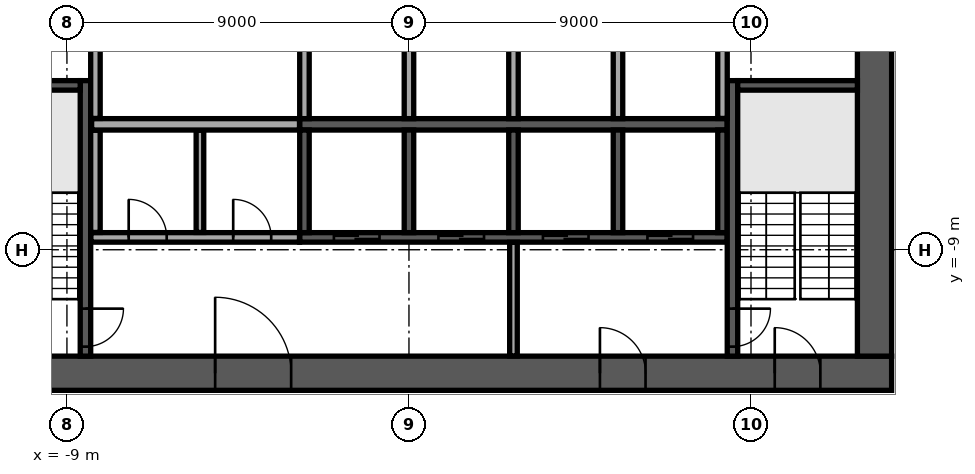
"""IFC4 building model, lengths in metres.
Left out: names, types, materials, properties, quantities, classifications, styles, units other than length and angle.
Written with IfcOpenShell. Run it as: python <this file> out.ifc"""

import sys

from ifc_helpers import new_model, si_unit, direction, frame, frame_2d, origin, place, context, subcontext, project, spatial, rectangle, extrude, element, fill, save


model = new_model("IFC4")
c1 = context("Model", 3, precision=1e-05, world=origin(), true_north=direction((0.0, 1.0)))
c2 = subcontext(c1, "Body", "Model", "MODEL_VIEW")
j1 = project(units=[si_unit("LENGTHUNIT", "METRE"), si_unit("PLANEANGLEUNIT", "RADIAN")], contexts=[c1])
p1 = place(None, origin())
s1 = spatial("IfcSite", under=j1, at=p1, CompositionType="ELEMENT")
p2 = place(p1, origin())
s2 = spatial("IfcBuilding", under=s1, at=p2, CompositionType="ELEMENT")
p3 = place(p2, frame((0.0, 0.0, 189.3)))
s3 = spatial("IfcBuildingStorey", under=s2, at=p3, CompositionType="ELEMENT", Elevation=189.3)
p4 = place(p3, frame((-12.7, -12.25, 0.0), z_axis=(0.0, 0.0, 1.0), x_axis=(1.0, 0.0, 0.0)))
e1 = element("IfcWall", 1, at=p4, inside=s3, PredefinedType="SHEAR", context=c2, shape_type="SweptSolid", body=[
    extrude(rectangle(XDim=25.4, YDim=0.9, at=frame_2d((12.7, 0.0))), origin(), (0.0, 0.0, 1.0), 3.62),
])
p5 = place(p4, frame((7.6, 0.0, 0.0)))
e2 = element("IfcOpeningElement", 2, at=p5, cuts=e1, PredefinedType="OPENING", context=c2, shape_type="SweptSolid", body=[
    extrude(rectangle(XDim=2.0, YDim=2.1, at=frame_2d((1.0, 1.05))), frame((0.0, 0.46, 0.0), z_axis=(0.0, -1.0, 0.0), x_axis=(1.0, 0.0, 0.0)), (0.0, 0.0, 1.0), 0.92),
])
p6 = place(p4, frame((17.725, 0.0, 0.0)))
e3 = element("IfcOpeningElement", 3, at=p6, cuts=e1, PredefinedType="OPENING", context=c2, shape_type="SweptSolid", body=[
    extrude(rectangle(XDim=1.2, YDim=2.1, at=frame_2d((0.6, 1.05))), frame((0.0, 0.46, 0.0), z_axis=(0.0, -1.0, 0.0), x_axis=(1.0, 0.0, 0.0)), (0.0, 0.0, 1.0), 0.92),
])
p7 = place(p4, frame((1.875, 0.0, 0.0)))
e4 = element("IfcOpeningElement", 4, at=p7, cuts=e1, PredefinedType="OPENING", context=c2, shape_type="SweptSolid", body=[
    extrude(rectangle(XDim=1.2, YDim=2.1, at=frame_2d((0.6, 1.05))), frame((0.0, 0.46, 0.0), z_axis=(0.0, -1.0, 0.0), x_axis=(1.0, 0.0, 0.0)), (0.0, 0.0, 1.0), 0.92),
])
p8 = place(p4, frame((22.325, 0.0, 0.0)))
e5 = element("IfcOpeningElement", 5, at=p8, cuts=e1, PredefinedType="OPENING", context=c2, shape_type="SweptSolid", body=[
    extrude(rectangle(XDim=1.2, YDim=2.1, at=frame_2d((0.6, 1.05))), frame((0.0, 0.46, 0.0), z_axis=(0.0, -1.0, 0.0), x_axis=(1.0, 0.0, 0.0)), (0.0, 0.0, 1.0), 0.92),
])
p9 = place(p3, frame((12.25, -11.8, 0.0), z_axis=(0.0, 0.0, 1.0), x_axis=(0.0, 1.0, 0.0)))
e6 = element("IfcWall", 6, at=p9, inside=s3, PredefinedType="SHEAR", context=c2, shape_type="SweptSolid", body=[
    extrude(rectangle(XDim=23.6, YDim=0.9, at=frame_2d((11.8, 0.0))), origin(), (0.0, 0.0, 1.0), 3.62),
])
p10 = place(p9, frame((10.6, 0.0, 0.0)))
e7 = element("IfcOpeningElement", 7, at=p10, cuts=e6, PredefinedType="OPENING", context=c2, shape_type="SweptSolid", body=[
    extrude(rectangle(XDim=2.4, YDim=2.4, at=frame_2d((1.2, 1.2))), frame((0.0, 0.46, 0.0), z_axis=(0.0, -1.0, 0.0), x_axis=(1.0, 0.0, 0.0)), (0.0, 0.0, 1.0), 0.92),
])
p11 = place(p3, frame((-2.875, -5.7, 0.0), z_axis=(0.0, 0.0, 1.0), x_axis=(1.0, 0.0, 0.0)))
e8 = element("IfcWall", 8, at=p11, inside=s3, PredefinedType="SOLIDWALL", context=c2, shape_type="SweptSolid", body=[
    extrude(rectangle(XDim=11.25, YDim=0.3, at=frame_2d((5.625, 0.0))), origin(), (0.0, 0.0, 1.0), 3.62),
])
for number, where, z_axis, x_axis in (
    (9, (-2.75, -5.55, 0.0), (0.0, 0.0, 1.0), (0.0, 1.0, 0.0)),
    (10, (0.0, -5.55, 0.0), (0.0, 0.0, 1.0), (0.0, 1.0, 0.0)),
    (11, (2.75, -5.55, 0.0), (0.0, 0.0, 1.0), (0.0, 1.0, 0.0)),
    (12, (5.5, -5.55, 0.0), (0.0, 0.0, 1.0), (0.0, 1.0, 0.0)),
):
    element("IfcWall", number, at=place(p3, frame(where, z_axis=z_axis, x_axis=x_axis)), inside=s3, PredefinedType="SOLIDWALL", context=c2, shape_type="SweptSolid", body=[
        extrude(rectangle(XDim=2.7, YDim=0.25, at=frame_2d((1.35, 0.0))), origin(), (0.0, 0.0, 1.0), 3.62),
    ])
p12 = place(p3, frame((-2.875, -8.675, 0.0), z_axis=(0.0, 0.0, 1.0), x_axis=(1.0, 0.0, 0.0)))
e13 = element("IfcWall", 13, at=p12, inside=s3, PredefinedType="SOLIDWALL", context=c2, shape_type="SweptSolid", body=[
    extrude(rectangle(XDim=11.25, YDim=0.25, at=frame_2d((5.625, 0.0))), origin(), (0.0, 0.0, 1.0), 3.62),
])
p13 = place(p12, frame((0.9, 0.0, 0.0)))
e14 = element("IfcOpeningElement", 14, at=p13, cuts=e13, PredefinedType="OPENING", context=c2, shape_type="SweptSolid", body=[
    extrude(rectangle(XDim=1.2, YDim=2.1, at=frame_2d((0.6, 1.05))), frame((0.0, 0.135, 0.0), z_axis=(0.0, -1.0, 0.0), x_axis=(1.0, 0.0, 0.0)), (0.0, 0.0, 1.0), 0.27),
])
p14 = place(p12, frame((3.65, 0.0, 0.0)))
e15 = element("IfcOpeningElement", 15, at=p14, cuts=e13, PredefinedType="OPENING", context=c2, shape_type="SweptSolid", body=[
    extrude(rectangle(XDim=1.2, YDim=2.1, at=frame_2d((0.6, 1.05))), frame((0.0, 0.135, 0.0), z_axis=(0.0, -1.0, 0.0), x_axis=(1.0, 0.0, 0.0)), (0.0, 0.0, 1.0), 0.27),
])
p15 = place(p12, frame((6.4, 0.0, 0.0)))
e16 = element("IfcOpeningElement", 16, at=p15, cuts=e13, PredefinedType="OPENING", context=c2, shape_type="SweptSolid", body=[
    extrude(rectangle(XDim=1.2, YDim=2.1, at=frame_2d((0.6, 1.05))), frame((0.0, 0.135, 0.0), z_axis=(0.0, -1.0, 0.0), x_axis=(1.0, 0.0, 0.0)), (0.0, 0.0, 1.0), 0.27),
])
p16 = place(p12, frame((9.15, 0.0, 0.0)))
e17 = element("IfcOpeningElement", 17, at=p16, cuts=e13, PredefinedType="OPENING", context=c2, shape_type="SweptSolid", body=[
    extrude(rectangle(XDim=1.2, YDim=2.1, at=frame_2d((0.6, 1.05))), frame((0.0, 0.135, 0.0), z_axis=(0.0, -1.0, 0.0), x_axis=(1.0, 0.0, 0.0)), (0.0, 0.0, 1.0), 0.27),
])
for number, where, z_axis, x_axis in (
    (18, (-2.75, -8.55, 0.0), (0.0, 0.0, 1.0), (0.0, 1.0, 0.0)),
    (19, (0.0, -8.55, 0.0), (0.0, 0.0, 1.0), (0.0, 1.0, 0.0)),
    (20, (2.75, -8.55, 0.0), (0.0, 0.0, 1.0), (0.0, 1.0, 0.0)),
    (21, (5.5, -8.55, 0.0), (0.0, 0.0, 1.0), (0.0, 1.0, 0.0)),
    (22, (8.25, -8.55, 0.0), (0.0, 0.0, 1.0), (0.0, 1.0, 0.0)),
):
    element("IfcWall", number, at=place(p3, frame(where, z_axis=z_axis, x_axis=x_axis)), inside=s3, PredefinedType="SOLIDWALL", context=c2, shape_type="SweptSolid", body=[
        extrude(rectangle(XDim=2.7, YDim=0.25, at=frame_2d((1.35, 0.0))), origin(), (0.0, 0.0, 1.0), 3.62),
    ])
p17 = place(p3, frame((-8.512, -4.55, 0.0), z_axis=(0.0, 0.0, 1.0), x_axis=(0.0, -1.0, 0.0)))
e23 = element("IfcWall", 23, at=p17, inside=s3, PredefinedType="SOLIDWALL", context=c2, shape_type="SweptSolid", body=[
    extrude(rectangle(XDim=7.25, YDim=0.275, at=frame_2d((3.625, 0.0))), origin(), (0.0, 0.0, 1.0), 3.62),
])
p18 = place(p17, frame((6.0, 0.0, 0.0)))
e24 = element("IfcOpeningElement", 24, at=p18, cuts=e23, PredefinedType="OPENING", context=c2, shape_type="SweptSolid", body=[
    extrude(rectangle(XDim=1.0, YDim=2.1, at=frame_2d((0.5, 1.05))), frame((0.0, 0.147, 0.0), z_axis=(0.0, -1.0, 0.0), x_axis=(1.0, 0.0, 0.0)), (0.0, 0.0, 1.0), 0.295),
])
p19 = place(p3, frame((-8.65, -4.675, 0.0), z_axis=(0.0, 0.0, 1.0), x_axis=(-1.0, 0.0, 0.0)))
e25 = element("IfcWall", 25, at=p19, inside=s3, PredefinedType="SOLIDWALL", context=c2, shape_type="SweptSolid", body=[
    extrude(rectangle(XDim=3.15, YDim=0.25, at=frame_2d((1.575, 0.0))), origin(), (0.0, 0.0, 1.0), 3.62),
])
p20 = place(p3, frame((8.512, -4.55, 0.0), z_axis=(0.0, 0.0, 1.0), x_axis=(0.0, -1.0, 0.0)))
e26 = element("IfcWall", 26, at=p20, inside=s3, PredefinedType="SOLIDWALL", context=c2, shape_type="SweptSolid", body=[
    extrude(rectangle(XDim=7.25, YDim=0.275, at=frame_2d((3.625, 0.0))), origin(), (0.0, 0.0, 1.0), 3.62),
])
p21 = place(p20, frame((6.0, 0.0, 0.0)))
e27 = element("IfcOpeningElement", 27, at=p21, cuts=e26, PredefinedType="OPENING", context=c2, shape_type="SweptSolid", body=[
    extrude(rectangle(XDim=1.0, YDim=2.1, at=frame_2d((0.5, 1.05))), frame((0.0, 0.147, 0.0), z_axis=(0.0, -1.0, 0.0), x_axis=(1.0, 0.0, 0.0)), (0.0, 0.0, 1.0), 0.295),
])
p22 = place(p3, frame((8.65, -4.675, 0.0), z_axis=(0.0, 0.0, 1.0), x_axis=(1.0, 0.0, 0.0)))
e28 = element("IfcWall", 28, at=p22, inside=s3, PredefinedType="SOLIDWALL", context=c2, shape_type="SweptSolid", body=[
    extrude(rectangle(XDim=3.15, YDim=0.25, at=frame_2d((1.575, 0.0))), origin(), (0.0, 0.0, 1.0), 3.62),
])
p23 = place(p3, frame((2.75, -11.795, 0.0), z_axis=(0.0, 0.0, 1.0), x_axis=(0.0, 1.0, 0.0)))
e29 = element("IfcWall", 29, at=p23, inside=s3, PredefinedType="PARTITIONING", context=c2, shape_type="SweptSolid", body=[
    extrude(rectangle(XDim=2.99, YDim=0.2, at=frame_2d((1.495, 0.0))), origin(), (0.0, 0.0, 1.0), 3.62),
])
p24 = place(p3, frame((-8.37, -8.675, 0.0), z_axis=(0.0, 0.0, 1.0), x_axis=(1.0, 0.0, 0.0)))
e30 = element("IfcWall", 30, at=p24, inside=s3, PredefinedType="PARTITIONING", context=c2, shape_type="SweptSolid", body=[
    extrude(rectangle(XDim=5.49, YDim=0.25, at=frame_2d((2.745, 0.0))), origin(), (0.0, 0.0, 1.0), 3.62),
])
p25 = place(p24, frame((0.995, 0.0, 0.0)))
e31 = element("IfcOpeningElement", 31, at=p25, cuts=e30, PredefinedType="OPENING", context=c2, shape_type="SweptSolid", body=[
    extrude(rectangle(XDim=1.0, YDim=2.1, at=frame_2d((0.5, 1.05))), frame((0.0, 0.135, 0.0), z_axis=(0.0, -1.0, 0.0), x_axis=(1.0, 0.0, 0.0)), (0.0, 0.0, 1.0), 0.27),
])
p26 = place(p24, frame((3.745, 0.0, 0.0)))
e32 = element("IfcOpeningElement", 32, at=p26, cuts=e30, PredefinedType="OPENING", context=c2, shape_type="SweptSolid", body=[
    extrude(rectangle(XDim=1.0, YDim=2.1, at=frame_2d((0.5, 1.05))), frame((0.0, 0.135, 0.0), z_axis=(0.0, -1.0, 0.0), x_axis=(1.0, 0.0, 0.0)), (0.0, 0.0, 1.0), 0.27),
])
p27 = place(p3, frame((-8.25, -8.545, 0.0), z_axis=(0.0, 0.0, 1.0), x_axis=(0.0, 1.0, 0.0)))
e33 = element("IfcWall", 33, at=p27, inside=s3, PredefinedType="PARTITIONING", context=c2, shape_type="SweptSolid", body=[
    extrude(rectangle(XDim=2.69, YDim=0.25, at=frame_2d((1.345, 0.0))), origin(), (0.0, 0.0, 1.0), 3.62),
])
p28 = place(p3, frame((-5.5, -8.545, 0.0), z_axis=(0.0, 0.0, 1.0), x_axis=(0.0, 1.0, 0.0)))
e34 = element("IfcWall", 34, at=p28, inside=s3, PredefinedType="PARTITIONING", context=c2, shape_type="SweptSolid", body=[
    extrude(rectangle(XDim=2.69, YDim=0.2, at=frame_2d((1.345, 0.0))), origin(), (0.0, 0.0, 1.0), 3.62),
])
p29 = place(p3, frame((-8.35, -5.7, 0.0), z_axis=(0.0, 0.0, 1.0), x_axis=(1.0, 0.0, 0.0)))
e35 = element("IfcWall", 35, at=p29, inside=s3, PredefinedType="PARTITIONING", context=c2, shape_type="SweptSolid", body=[
    extrude(rectangle(XDim=5.47, YDim=0.3, at=frame_2d((2.735, 0.0))), origin(), (0.0, 0.0, 1.0), 3.62),
])
for number, where, z_axis, x_axis in (
    (36, (-8.25, -5.545, 0.0), (0.0, 0.0, 1.0), (0.0, 1.0, 0.0)),
    (37, (8.25, -5.545, 0.0), (0.0, 0.0, 1.0), (0.0, 1.0, 0.0)),
):
    element("IfcWall", number, at=place(p3, frame(where, z_axis=z_axis, x_axis=x_axis)), inside=s3, PredefinedType="PARTITIONING", context=c2, shape_type="SweptSolid", body=[
        extrude(rectangle(XDim=2.69, YDim=0.25, at=frame_2d((1.345, 0.0))), origin(), (0.0, 0.0, 1.0), 3.62),
    ])
p30 = place(p3, frame((-2.286, -34.715, 0.0), z_axis=(0.0, 0.0, 1.0), x_axis=(0.754708272811, 0.656060532993, 0.0)))
e38 = element("IfcWall", 38, at=p30, inside=s3, PredefinedType="STANDARD", context=c2, shape_type="SweptSolid", body=[
    extrude(rectangle(XDim=49.0, YDim=0.6, at=frame_2d((24.5, 0.0))), origin(), (0.0, 0.0, 1.0), 3.62),
])
p31 = place(p30, frame((1.227, 0.0, 0.9)))
e39 = element("IfcOpeningElement", 39, at=p31, cuts=e38, PredefinedType="OPENING", context=c2, shape_type="SweptSolid", body=[
    extrude(rectangle(XDim=2.0, YDim=2.1, at=frame_2d((1.0, 1.05))), frame((0.0, 0.31, 0.0), z_axis=(0.0, -1.0, 0.0), x_axis=(1.0, 0.0, 0.0)), (0.0, 0.0, 1.0), 0.62),
])
p32 = place(p30, frame((5.682, 0.0, 0.9)))
e40 = element("IfcOpeningElement", 40, at=p32, cuts=e38, PredefinedType="OPENING", context=c2, shape_type="SweptSolid", body=[
    extrude(rectangle(XDim=2.0, YDim=2.1, at=frame_2d((1.0, 1.05))), frame((0.0, 0.31, 0.0), z_axis=(0.0, -1.0, 0.0), x_axis=(1.0, 0.0, 0.0)), (0.0, 0.0, 1.0), 0.62),
])
p33 = place(p30, frame((10.136, 0.0, 0.9)))
e41 = element("IfcOpeningElement", 41, at=p33, cuts=e38, PredefinedType="OPENING", context=c2, shape_type="SweptSolid", body=[
    extrude(rectangle(XDim=2.0, YDim=2.1, at=frame_2d((1.0, 1.05))), frame((0.0, 0.31, 0.0), z_axis=(0.0, -1.0, 0.0), x_axis=(1.0, 0.0, 0.0)), (0.0, 0.0, 1.0), 0.62),
])
p34 = place(p30, frame((14.591, 0.0, 0.9)))
e42 = element("IfcOpeningElement", 42, at=p34, cuts=e38, PredefinedType="OPENING", context=c2, shape_type="SweptSolid", body=[
    extrude(rectangle(XDim=2.0, YDim=2.1, at=frame_2d((1.0, 1.05))), frame((0.0, 0.31, 0.0), z_axis=(0.0, -1.0, 0.0), x_axis=(1.0, 0.0, 0.0)), (0.0, 0.0, 1.0), 0.62),
])
p35 = place(p30, frame((19.045, 0.0, 0.9)))
e43 = element("IfcOpeningElement", 43, at=p35, cuts=e38, PredefinedType="OPENING", context=c2, shape_type="SweptSolid", body=[
    extrude(rectangle(XDim=2.0, YDim=2.1, at=frame_2d((1.0, 1.05))), frame((0.0, 0.31, 0.0), z_axis=(0.0, -1.0, 0.0), x_axis=(1.0, 0.0, 0.0)), (0.0, 0.0, 1.0), 0.62),
])
p36 = place(p30, frame((23.5, 0.0, 0.9)))
e44 = element("IfcOpeningElement", 44, at=p36, cuts=e38, PredefinedType="OPENING", context=c2, shape_type="SweptSolid", body=[
    extrude(rectangle(XDim=2.0, YDim=2.1, at=frame_2d((1.0, 1.05))), frame((0.0, 0.31, 0.0), z_axis=(0.0, -1.0, 0.0), x_axis=(1.0, 0.0, 0.0)), (0.0, 0.0, 1.0), 0.62),
])
p37 = place(p30, frame((27.955, 0.0, 0.9)))
e45 = element("IfcOpeningElement", 45, at=p37, cuts=e38, PredefinedType="OPENING", context=c2, shape_type="SweptSolid", body=[
    extrude(rectangle(XDim=2.0, YDim=2.1, at=frame_2d((1.0, 1.05))), frame((0.0, 0.31, 0.0), z_axis=(0.0, -1.0, 0.0), x_axis=(1.0, 0.0, 0.0)), (0.0, 0.0, 1.0), 0.62),
])
p38 = place(p30, frame((32.409, 0.0, 0.9)))
e46 = element("IfcOpeningElement", 46, at=p38, cuts=e38, PredefinedType="OPENING", context=c2, shape_type="SweptSolid", body=[
    extrude(rectangle(XDim=2.0, YDim=2.1, at=frame_2d((1.0, 1.05))), frame((0.0, 0.31, 0.0), z_axis=(0.0, -1.0, 0.0), x_axis=(1.0, 0.0, 0.0)), (0.0, 0.0, 1.0), 0.62),
])
p39 = place(p30, frame((36.864, 0.0, 0.9)))
e47 = element("IfcOpeningElement", 47, at=p39, cuts=e38, PredefinedType="OPENING", context=c2, shape_type="SweptSolid", body=[
    extrude(rectangle(XDim=2.0, YDim=2.1, at=frame_2d((1.0, 1.05))), frame((0.0, 0.31, 0.0), z_axis=(0.0, -1.0, 0.0), x_axis=(1.0, 0.0, 0.0)), (0.0, 0.0, 1.0), 0.62),
])
p40 = place(p30, frame((41.318, 0.0, 0.9)))
e48 = element("IfcOpeningElement", 48, at=p40, cuts=e38, PredefinedType="OPENING", context=c2, shape_type="SweptSolid", body=[
    extrude(rectangle(XDim=2.0, YDim=2.1, at=frame_2d((1.0, 1.05))), frame((0.0, 0.31, 0.0), z_axis=(0.0, -1.0, 0.0), x_axis=(1.0, 0.0, 0.0)), (0.0, 0.0, 1.0), 0.62),
])
p41 = place(p30, frame((45.773, 0.0, 0.9)))
e49 = element("IfcOpeningElement", 49, at=p41, cuts=e38, PredefinedType="OPENING", context=c2, shape_type="SweptSolid", body=[
    extrude(rectangle(XDim=2.0, YDim=2.1, at=frame_2d((1.0, 1.05))), frame((0.0, 0.31, 0.0), z_axis=(0.0, -1.0, 0.0), x_axis=(1.0, 0.0, 0.0)), (0.0, 0.0, 1.0), 0.62),
])
p42 = place(p3, frame((-24.98, -4.673, 0.0), z_axis=(0.0, 0.0, 1.0), x_axis=(0.656048444225, -0.754718781289, 0.0)))
e50 = element("IfcWall", 50, at=p42, inside=s3, PredefinedType="PARTITIONING", context=c2, shape_type="SweptSolid", body=[
    extrude(rectangle(XDim=25.8, YDim=0.15, at=frame_2d((12.9, 0.0))), origin(), (0.0, 0.0, 1.0), 3.17),
])
p43 = place(p42, frame((12.071, 0.0, 0.0)))
e51 = element("IfcOpeningElement", 51, at=p43, cuts=e50, PredefinedType="OPENING", context=c2, shape_type="SweptSolid", body=[
    extrude(rectangle(XDim=1.0, YDim=2.1, at=frame_2d((0.5, 1.05))), frame((0.0, 0.085, 0.0), z_axis=(0.0, -1.0, 0.0), x_axis=(1.0, 0.0, 0.0)), (0.0, 0.0, 1.0), 0.17),
])
p44 = place(p42, frame((24.318, 0.0, 0.0)))
e52 = element("IfcOpeningElement", 52, at=p44, cuts=e50, PredefinedType="OPENING", context=c2, shape_type="SweptSolid", body=[
    extrude(rectangle(XDim=1.0, YDim=2.1, at=frame_2d((0.5, 1.05))), frame((0.0, 0.085, 0.0), z_axis=(0.0, -1.0, 0.0), x_axis=(1.0, 0.0, 0.0)), (0.0, 0.0, 1.0), 0.17),
])
p45 = place(p3, frame((-1.0, -26.268, 0.0), z_axis=(0.0, 0.0, 1.0), x_axis=(0.754711356604, 0.656056985492, 0.0)))
e53 = element("IfcWall", 53, at=p45, inside=s3, PredefinedType="PARTITIONING", context=c2, shape_type="SweptSolid", body=[
    extrude(rectangle(XDim=36.052, YDim=0.15, at=frame_2d((18.026, 0.0))), origin(), (0.0, 0.0, 1.0), 3.17),
])
p46 = place(p45, frame((9.598, 0.0, 0.0)))
e54 = element("IfcOpeningElement", 54, at=p46, cuts=e53, PredefinedType="OPENING", context=c2, shape_type="SweptSolid", body=[
    extrude(rectangle(XDim=1.0, YDim=2.1, at=frame_2d((0.5, 1.05))), frame((0.0, 0.085, 0.0), z_axis=(0.0, -1.0, 0.0), x_axis=(1.0, 0.0, 0.0)), (0.0, 0.0, 1.0), 0.17),
])
p47 = place(p45, frame((20.957, 0.0, 0.0)))
e55 = element("IfcOpeningElement", 55, at=p47, cuts=e53, PredefinedType="OPENING", context=c2, shape_type="SweptSolid", body=[
    extrude(rectangle(XDim=1.0, YDim=2.1, at=frame_2d((0.5, 1.05))), frame((0.0, 0.085, 0.0), z_axis=(0.0, -1.0, 0.0), x_axis=(1.0, 0.0, 0.0)), (0.0, 0.0, 1.0), 0.17),
])
p48 = place(p45, frame((27.87, 0.0, 0.0)))
e56 = element("IfcOpeningElement", 56, at=p48, cuts=e53, PredefinedType="OPENING", context=c2, shape_type="SweptSolid", body=[
    extrude(rectangle(XDim=1.8, YDim=2.1, at=frame_2d((0.9, 1.05))), frame((0.0, 0.085, 0.0), z_axis=(0.0, -1.0, 0.0), x_axis=(1.0, 0.0, 0.0)), (0.0, 0.0, 1.0), 0.17),
])
p49 = place(p5, origin())
e57 = element("IfcDoor", 57, at=p49, inside=s3, OperationType="SINGLE_SWING_LEFT", PredefinedType="DOOR", context=c2, shape_type="SweptSolid", body=[
    extrude(rectangle(XDim=2.0, YDim=2.1, at=frame_2d((1.0, 1.05))), frame((0.0, 0.025, 0.0), z_axis=(0.0, -1.0, 0.0), x_axis=(1.0, 0.0, 0.0)), (0.0, 0.0, 1.0), 0.05),
])
fill(e2, e57)
p50 = place(p6, origin())
e58 = element("IfcDoor", 58, at=p50, inside=s3, OperationType="SINGLE_SWING_LEFT", PredefinedType="DOOR", context=c2, shape_type="SweptSolid", body=[
    extrude(rectangle(XDim=1.2, YDim=2.1, at=frame_2d((0.6, 1.05))), frame((0.0, 0.025, 0.0), z_axis=(0.0, -1.0, 0.0), x_axis=(1.0, 0.0, 0.0)), (0.0, 0.0, 1.0), 0.05),
])
fill(e3, e58)
p51 = place(p8, origin())
e59 = element("IfcDoor", 59, at=p51, inside=s3, OperationType="SINGLE_SWING_LEFT", PredefinedType="DOOR", context=c2, shape_type="SweptSolid", body=[
    extrude(rectangle(XDim=1.2, YDim=2.1, at=frame_2d((0.6, 1.05))), frame((0.0, 0.025, 0.0), z_axis=(0.0, -1.0, 0.0), x_axis=(1.0, 0.0, 0.0)), (0.0, 0.0, 1.0), 0.05),
])
fill(e5, e59)
p52 = place(p13, origin())
e60 = element("IfcDoor", 60, at=p52, inside=s3, OperationType="DOUBLE_DOOR_SLIDING", PredefinedType="DOOR", context=c2, shape_type="SweptSolid", body=[
    extrude(rectangle(XDim=1.2, YDim=2.1, at=frame_2d((0.6, 1.05))), frame((0.0, 0.025, 0.0), z_axis=(0.0, -1.0, 0.0), x_axis=(1.0, 0.0, 0.0)), (0.0, 0.0, 1.0), 0.05),
])
fill(e14, e60)
p53 = place(p14, origin())
e61 = element("IfcDoor", 61, at=p53, inside=s3, OperationType="DOUBLE_DOOR_SLIDING", PredefinedType="DOOR", context=c2, shape_type="SweptSolid", body=[
    extrude(rectangle(XDim=1.2, YDim=2.1, at=frame_2d((0.6, 1.05))), frame((0.0, 0.025, 0.0), z_axis=(0.0, -1.0, 0.0), x_axis=(1.0, 0.0, 0.0)), (0.0, 0.0, 1.0), 0.05),
])
fill(e15, e61)
p54 = place(p15, origin())
e62 = element("IfcDoor", 62, at=p54, inside=s3, OperationType="DOUBLE_DOOR_SLIDING", PredefinedType="DOOR", context=c2, shape_type="SweptSolid", body=[
    extrude(rectangle(XDim=1.2, YDim=2.1, at=frame_2d((0.6, 1.05))), frame((0.0, 0.025, 0.0), z_axis=(0.0, -1.0, 0.0), x_axis=(1.0, 0.0, 0.0)), (0.0, 0.0, 1.0), 0.05),
])
fill(e16, e62)
p55 = place(p16, origin())
e63 = element("IfcDoor", 63, at=p55, inside=s3, OperationType="DOUBLE_DOOR_SLIDING", PredefinedType="DOOR", context=c2, shape_type="SweptSolid", body=[
    extrude(rectangle(XDim=1.2, YDim=2.1, at=frame_2d((0.6, 1.05))), frame((0.0, 0.025, 0.0), z_axis=(0.0, -1.0, 0.0), x_axis=(1.0, 0.0, 0.0)), (0.0, 0.0, 1.0), 0.05),
])
fill(e17, e63)
p56 = place(p18, origin())
e64 = element("IfcDoor", 64, at=p56, inside=s3, OperationType="SINGLE_SWING_LEFT", PredefinedType="DOOR", context=c2, shape_type="SweptSolid", body=[
    extrude(rectangle(XDim=1.0, YDim=2.1, at=frame_2d((0.5, 1.05))), frame((0.0, 0.025, 0.0), z_axis=(0.0, -1.0, 0.0), x_axis=(1.0, 0.0, 0.0)), (0.0, 0.0, 1.0), 0.05),
])
fill(e24, e64)
p57 = place(p21, origin())
e65 = element("IfcDoor", 65, at=p57, inside=s3, OperationType="SINGLE_SWING_LEFT", PredefinedType="DOOR", context=c2, shape_type="SweptSolid", body=[
    extrude(rectangle(XDim=1.0, YDim=2.1, at=frame_2d((0.5, 1.05))), frame((0.0, 0.025, 0.0), z_axis=(0.0, -1.0, 0.0), x_axis=(1.0, 0.0, 0.0)), (0.0, 0.0, 1.0), 0.05),
])
fill(e27, e65)
p58 = place(p25, origin())
e66 = element("IfcDoor", 66, at=p58, inside=s3, OperationType="SINGLE_SWING_LEFT", PredefinedType="DOOR", context=c2, shape_type="SweptSolid", body=[
    extrude(rectangle(XDim=1.0, YDim=2.1, at=frame_2d((0.5, 1.05))), frame((0.0, 0.025, 0.0), z_axis=(0.0, -1.0, 0.0), x_axis=(1.0, 0.0, 0.0)), (0.0, 0.0, 1.0), 0.05),
])
fill(e31, e66)
p59 = place(p26, origin())
e67 = element("IfcDoor", 67, at=p59, inside=s3, OperationType="SINGLE_SWING_LEFT", PredefinedType="DOOR", context=c2, shape_type="SweptSolid", body=[
    extrude(rectangle(XDim=1.0, YDim=2.1, at=frame_2d((0.5, 1.05))), frame((0.0, 0.025, 0.0), z_axis=(0.0, -1.0, 0.0), x_axis=(1.0, 0.0, 0.0)), (0.0, 0.0, 1.0), 0.05),
])
fill(e32, e67)
save(model, sys.argv[1])
